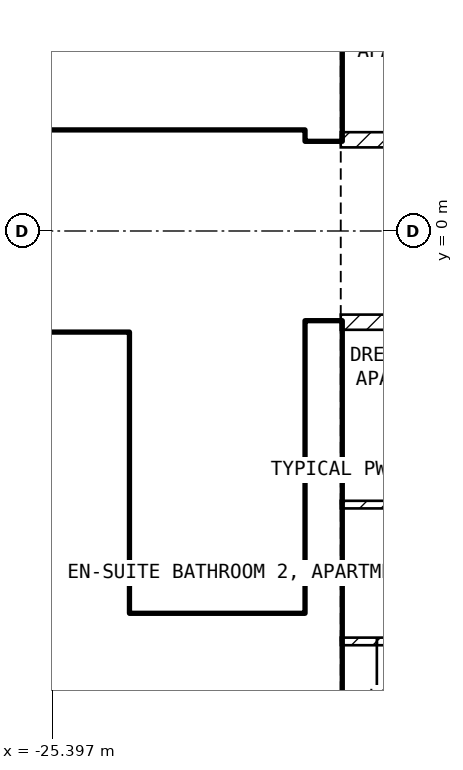
"""IFC4 building model, lengths in metres.
Left out: names, types, materials, properties, quantities, classifications, styles, units other than length and angle.
Written with IfcOpenShell. Run it as: python <this file> out.ifc"""

import sys

from ifc_helpers import new_model, si_unit, direction, frame, frame_2d, origin, place, context, subcontext, project, spatial, rectangle, extrude, element, fill, save


model = new_model("IFC4")
c1 = context("Model", 3, precision=1e-05, world=origin(), true_north=direction((0.0, 1.0)))
c2 = subcontext(c1, "Body", "Model", "MODEL_VIEW")
j1 = project(units=[si_unit("LENGTHUNIT", "METRE"), si_unit("PLANEANGLEUNIT", "RADIAN")], contexts=[c1])
p1 = place(None, origin())
s1 = spatial("IfcSite", under=j1, at=p1, CompositionType="ELEMENT")
p2 = place(p1, origin())
s2 = spatial("IfcBuilding", under=s1, at=p2, CompositionType="ELEMENT")
p3 = place(p2, frame((0.0, 0.0, 61.0)))
s3 = spatial("IfcBuildingStorey", under=s2, at=p3, CompositionType="ELEMENT", Elevation=61.0)
for number, where, z_axis, x_axis in (
    (1, (-21.825, -8.1, 0.0), (0.0, 0.0, 1.0), (0.0, 1.0, 0.0)),
    (2, (-21.825, 1.2, 0.0), (0.0, 0.0, 1.0), (0.0, 1.0, 0.0)),
):
    element("IfcWall", number, at=place(p3, frame(where, z_axis=z_axis, x_axis=x_axis)), inside=s3, PredefinedType="SHEAR", context=c2, shape_type="SweptSolid", body=[
        extrude(rectangle(XDim=6.9, YDim=0.45, at=frame_2d((3.45, 0.0))), origin(), (0.0, 0.0, 1.0), 3.25),
    ])
p4 = place(p3, frame((-35.1, 1.45, 0.0), z_axis=(0.0, 0.0, 1.0), x_axis=(1.0, 0.0, 0.0)))
e3 = element("IfcWall", 3, at=p4, inside=s3, PredefinedType="SOLIDWALL", context=c2, shape_type="SweptSolid", body=[
    extrude(rectangle(XDim=13.05, YDim=0.2, at=frame_2d((6.525, 0.0))), origin(), (0.0, 0.0, 1.0), 3.25),
])
p5 = place(p4, frame((11.3, 0.0, 0.0)))
e4 = element("IfcOpeningElement", 4, at=p5, cuts=e3, PredefinedType="OPENING", context=c2, shape_type="SweptSolid", body=[
    extrude(rectangle(XDim=1.0, YDim=2.1, at=frame_2d((0.5, 1.05))), frame((0.0, 0.11, 0.0), z_axis=(0.0, -1.0, 0.0), x_axis=(1.0, 0.0, 0.0)), (0.0, 0.0, 1.0), 0.22),
])
p6 = place(p4, frame((8.8, 0.0, 0.0)))
e5 = element("IfcOpeningElement", 5, at=p6, cuts=e3, PredefinedType="OPENING", context=c2, shape_type="SweptSolid", body=[
    extrude(rectangle(XDim=1.0, YDim=2.1, at=frame_2d((0.5, 1.05))), frame((0.0, 0.11, 0.0), z_axis=(0.0, -1.0, 0.0), x_axis=(1.0, 0.0, 0.0)), (0.0, 0.0, 1.0), 0.22),
])
p7 = place(p3, frame((-24.5, -5.05, 0.0), z_axis=(0.0, 0.0, 1.0), x_axis=(0.0, 1.0, 0.0)))
e6 = element("IfcWall", 6, at=p7, inside=s3, PredefinedType="SOLIDWALL", context=c2, shape_type="SweptSolid", body=[
    extrude(rectangle(XDim=3.7, YDim=0.2, at=frame_2d((1.85, 0.0))), origin(), (0.0, 0.0, 1.0), 3.25),
])
p8 = place(p7, frame((0.1, 0.0, 0.0)))
e7 = element("IfcOpeningElement", 7, at=p8, cuts=e6, PredefinedType="OPENING", context=c2, shape_type="SweptSolid", body=[
    extrude(rectangle(XDim=0.8, YDim=2.1, at=frame_2d((0.4, 1.05))), frame((0.0, 0.11, 0.0), z_axis=(0.0, -1.0, 0.0), x_axis=(1.0, 0.0, 0.0)), (0.0, 0.0, 1.0), 0.22),
])
p9 = place(p3, frame((-28.35, -5.15, 0.0), z_axis=(0.0, 0.0, 1.0), x_axis=(1.0, 0.0, 0.0)))
e8 = element("IfcWall", 8, at=p9, inside=s3, PredefinedType="SOLIDWALL", context=c2, shape_type="SweptSolid", body=[
    extrude(rectangle(XDim=6.3, YDim=0.2, at=frame_2d((3.15, 0.0))), origin(), (0.0, 0.0, 1.0), 3.25),
])
p10 = place(p9, frame((5.1, 0.0, 0.0)))
e9 = element("IfcOpeningElement", 9, at=p10, cuts=e8, PredefinedType="OPENING", context=c2, shape_type="SweptSolid", body=[
    extrude(rectangle(XDim=1.0, YDim=2.1, at=frame_2d((0.5, 1.05))), frame((0.0, 0.11, 0.0), z_axis=(0.0, -1.0, 0.0), x_axis=(1.0, 0.0, 0.0)), (0.0, 0.0, 1.0), 0.22),
])
p11 = place(p3, frame((-35.1, -1.45, 0.0), z_axis=(0.0, 0.0, 1.0), x_axis=(1.0, 0.0, 0.0)))
e10 = element("IfcWall", 10, at=p11, inside=s3, PredefinedType="SOLIDWALL", context=c2, shape_type="SweptSolid", body=[
    extrude(rectangle(XDim=10.5, YDim=0.2, at=frame_2d((5.25, 0.0))), origin(), (0.0, 0.0, 1.0), 3.25),
])
p12 = place(p11, frame((3.3, 0.0, 0.0)))
e11 = element("IfcOpeningElement", 11, at=p12, cuts=e10, PredefinedType="OPENING", context=c2, shape_type="SweptSolid", body=[
    extrude(rectangle(XDim=1.0, YDim=2.1, at=frame_2d((0.5, 1.05))), frame((0.0, 0.11, 0.0), z_axis=(0.0, -1.0, 0.0), x_axis=(1.0, 0.0, 0.0)), (0.0, 0.0, 1.0), 0.22),
])
p13 = place(p11, frame((1.75, 0.0, 0.0)))
e12 = element("IfcOpeningElement", 12, at=p13, cuts=e10, PredefinedType="OPENING", context=c2, shape_type="SweptSolid", body=[
    extrude(rectangle(XDim=1.0, YDim=2.1, at=frame_2d((0.5, 1.05))), frame((0.0, 0.11, 0.0), z_axis=(0.0, -1.0, 0.0), x_axis=(1.0, 0.0, 0.0)), (0.0, 0.0, 1.0), 0.22),
])
p14 = place(p11, frame((0.2, 0.0, 0.0)))
e13 = element("IfcOpeningElement", 13, at=p14, cuts=e10, PredefinedType="OPENING", context=c2, shape_type="SweptSolid", body=[
    extrude(rectangle(XDim=1.0, YDim=2.1, at=frame_2d((0.5, 1.05))), frame((0.0, 0.11, 0.0), z_axis=(0.0, -1.0, 0.0), x_axis=(1.0, 0.0, 0.0)), (0.0, 0.0, 1.0), 0.22),
])
p15 = place(p11, frame((9.15, 0.0, 0.0)))
e14 = element("IfcOpeningElement", 14, at=p15, cuts=e10, PredefinedType="OPENING", context=c2, shape_type="SweptSolid", body=[
    extrude(rectangle(XDim=0.9, YDim=2.1, at=frame_2d((0.45, 1.05))), frame((0.0, 0.11, 0.0), z_axis=(0.0, -1.0, 0.0), x_axis=(1.0, 0.0, 0.0)), (0.0, 0.0, 1.0), 0.22),
])
p16 = place(p11, frame((6.15, 0.0, 0.0)))
e15 = element("IfcOpeningElement", 15, at=p16, cuts=e10, PredefinedType="OPENING", context=c2, shape_type="SweptSolid", body=[
    extrude(rectangle(XDim=0.9, YDim=2.1, at=frame_2d((0.45, 1.05))), frame((0.0, 0.11, 0.0), z_axis=(0.0, -1.0, 0.0), x_axis=(1.0, 0.0, 0.0)), (0.0, 0.0, 1.0), 0.22),
])
p17 = place(p3, frame((-35.1, -3.95, 0.0), z_axis=(0.0, 0.0, 1.0), x_axis=(1.0, 0.0, 0.0)))
e16 = element("IfcWall", 16, at=p17, inside=s3, PredefinedType="SOLIDWALL", context=c2, shape_type="SweptSolid", body=[
    extrude(rectangle(XDim=10.5, YDim=0.2, at=frame_2d((5.25, 0.0))), origin(), (0.0, 0.0, 1.0), 3.25),
])
p18 = place(p3, frame((-21.6, 1.2, 0.0), z_axis=(0.0, 0.0, 1.0), x_axis=(1.0, 0.0, 0.0)))
e17 = element("IfcWall", 17, at=p18, inside=s3, PredefinedType="PARTITIONING", context=c2, shape_type="SweptSolid", body=[
    extrude(rectangle(XDim=20.5, YDim=0.2, at=frame_2d((10.25, 0.0))), origin(), (0.0, 0.0, 1.0), 3.25),
])
p19 = place(p18, frame((10.3, 0.0, 0.0)))
e18 = element("IfcOpeningElement", 18, at=p19, cuts=e17, PredefinedType="OPENING", context=c2, shape_type="SweptSolid", body=[
    extrude(rectangle(XDim=1.0, YDim=2.1, at=frame_2d((0.5, 1.05))), frame((0.0, 0.11, 0.0), z_axis=(0.0, -1.0, 0.0), x_axis=(1.0, 0.0, 0.0)), (0.0, 0.0, 1.0), 0.22),
])
p20 = place(p3, frame((-1.1, -1.2, 0.0), z_axis=(0.0, 0.0, 1.0), x_axis=(-1.0, 0.0, 0.0)))
e19 = element("IfcWall", 19, at=p20, inside=s3, PredefinedType="PARTITIONING", context=c2, shape_type="SweptSolid", body=[
    extrude(rectangle(XDim=20.5, YDim=0.2, at=frame_2d((10.25, 0.0))), origin(), (0.0, 0.0, 1.0), 3.25),
])
p21 = place(p20, frame((16.025, 0.0, 0.0)))
e20 = element("IfcOpeningElement", 20, at=p21, cuts=e19, PredefinedType="OPENING", context=c2, shape_type="SweptSolid", body=[
    extrude(rectangle(XDim=1.0, YDim=2.1, at=frame_2d((0.5, 1.05))), frame((0.0, 0.11, 0.0), z_axis=(0.0, -1.0, 0.0), x_axis=(1.0, 0.0, 0.0)), (0.0, 0.0, 1.0), 0.22),
])
p22 = place(p3, frame((-18.0, -3.6, 0.0), z_axis=(0.0, 0.0, 1.0), x_axis=(-1.0, 0.0, 0.0)))
e21 = element("IfcWall", 21, at=p22, inside=s3, PredefinedType="PARTITIONING", context=c2, shape_type="SweptSolid", body=[
    extrude(rectangle(XDim=3.6, YDim=0.1, at=frame_2d((1.8, 0.0))), origin(), (0.0, 0.0, 1.0), 3.25),
])
p23 = place(p3, frame((-17.94, -5.4, 0.0), z_axis=(0.0, 0.0, 1.0), x_axis=(-1.0, 0.0, 0.0)))
e22 = element("IfcWall", 22, at=p23, inside=s3, PredefinedType="PARTITIONING", context=c2, shape_type="SweptSolid", body=[
    extrude(rectangle(XDim=3.66, YDim=0.1, at=frame_2d((1.83, 0.0))), origin(), (0.0, 0.0, 1.0), 3.25),
])
p24 = place(p23, frame((2.335, 0.0, 0.0)))
e23 = element("IfcOpeningElement", 23, at=p24, cuts=e22, PredefinedType="OPENING", context=c2, shape_type="SweptSolid", body=[
    extrude(rectangle(XDim=0.85, YDim=2.1, at=frame_2d((0.425, 1.05))), frame((0.0, 0.06, 0.0), z_axis=(0.0, -1.0, 0.0), x_axis=(1.0, 0.0, 0.0)), (0.0, 0.0, 1.0), 0.12),
])
p25 = place(p10, origin())
e24 = element("IfcDoor", 24, at=p25, inside=s3, OperationType="SINGLE_SWING_LEFT", PredefinedType="DOOR", context=c2, shape_type="SweptSolid", body=[
    extrude(rectangle(XDim=1.0, YDim=2.1, at=frame_2d((0.5, 1.05))), frame((0.0, 0.025, 0.0), z_axis=(0.0, -1.0, 0.0), x_axis=(1.0, 0.0, 0.0)), (0.0, 0.0, 1.0), 0.05),
])
fill(e9, e24)
p26 = place(p5, origin())
e25 = element("IfcDoor", 25, at=p26, inside=s3, OperationType="SINGLE_SWING_LEFT", PredefinedType="DOOR", context=c2, shape_type="SweptSolid", body=[
    extrude(rectangle(XDim=1.0, YDim=2.1, at=frame_2d((0.5, 1.05))), frame((0.0, 0.025, 0.0), z_axis=(0.0, -1.0, 0.0), x_axis=(1.0, 0.0, 0.0)), (0.0, 0.0, 1.0), 0.05),
])
fill(e4, e25)
p27 = place(p8, origin())
e26 = element("IfcDoor", 26, at=p27, inside=s3, OperationType="SINGLE_SWING_LEFT", PredefinedType="DOOR", context=c2, shape_type="SweptSolid", body=[
    extrude(rectangle(XDim=0.8, YDim=2.1, at=frame_2d((0.4, 1.05))), frame((0.0, 0.025, 0.0), z_axis=(0.0, -1.0, 0.0), x_axis=(1.0, 0.0, 0.0)), (0.0, 0.0, 1.0), 0.05),
])
fill(e7, e26)
p28 = place(p15, origin())
e27 = element("IfcDoor", 27, at=p28, inside=s3, OperationType="SINGLE_SWING_LEFT", PredefinedType="DOOR", context=c2, shape_type="SweptSolid", body=[
    extrude(rectangle(XDim=0.9, YDim=2.1, at=frame_2d((0.45, 1.05))), frame((0.0, 0.025, 0.0), z_axis=(0.0, -1.0, 0.0), x_axis=(1.0, 0.0, 0.0)), (0.0, 0.0, 1.0), 0.05),
])
fill(e14, e27)
p29 = place(p6, origin())
e28 = element("IfcDoor", 28, at=p29, inside=s3, OperationType="SINGLE_SWING_LEFT", PredefinedType="DOOR", context=c2, shape_type="SweptSolid", body=[
    extrude(rectangle(XDim=1.0, YDim=2.1, at=frame_2d((0.5, 1.05))), frame((0.0, 0.025, 0.0), z_axis=(0.0, -1.0, 0.0), x_axis=(1.0, 0.0, 0.0)), (0.0, 0.0, 1.0), 0.05),
])
fill(e5, e28)
p30 = place(p24, origin())
e29 = element("IfcDoor", 29, at=p30, inside=s3, OperationType="SINGLE_SWING_RIGHT", PredefinedType="DOOR", context=c2, shape_type="SweptSolid", body=[
    extrude(rectangle(XDim=0.85, YDim=2.1, at=frame_2d((0.425, 1.05))), frame((0.0, 0.025, 0.0), z_axis=(0.0, -1.0, 0.0), x_axis=(1.0, 0.0, 0.0)), (0.0, 0.0, 1.0), 0.05),
])
fill(e23, e29)
save(model, sys.argv[1])
